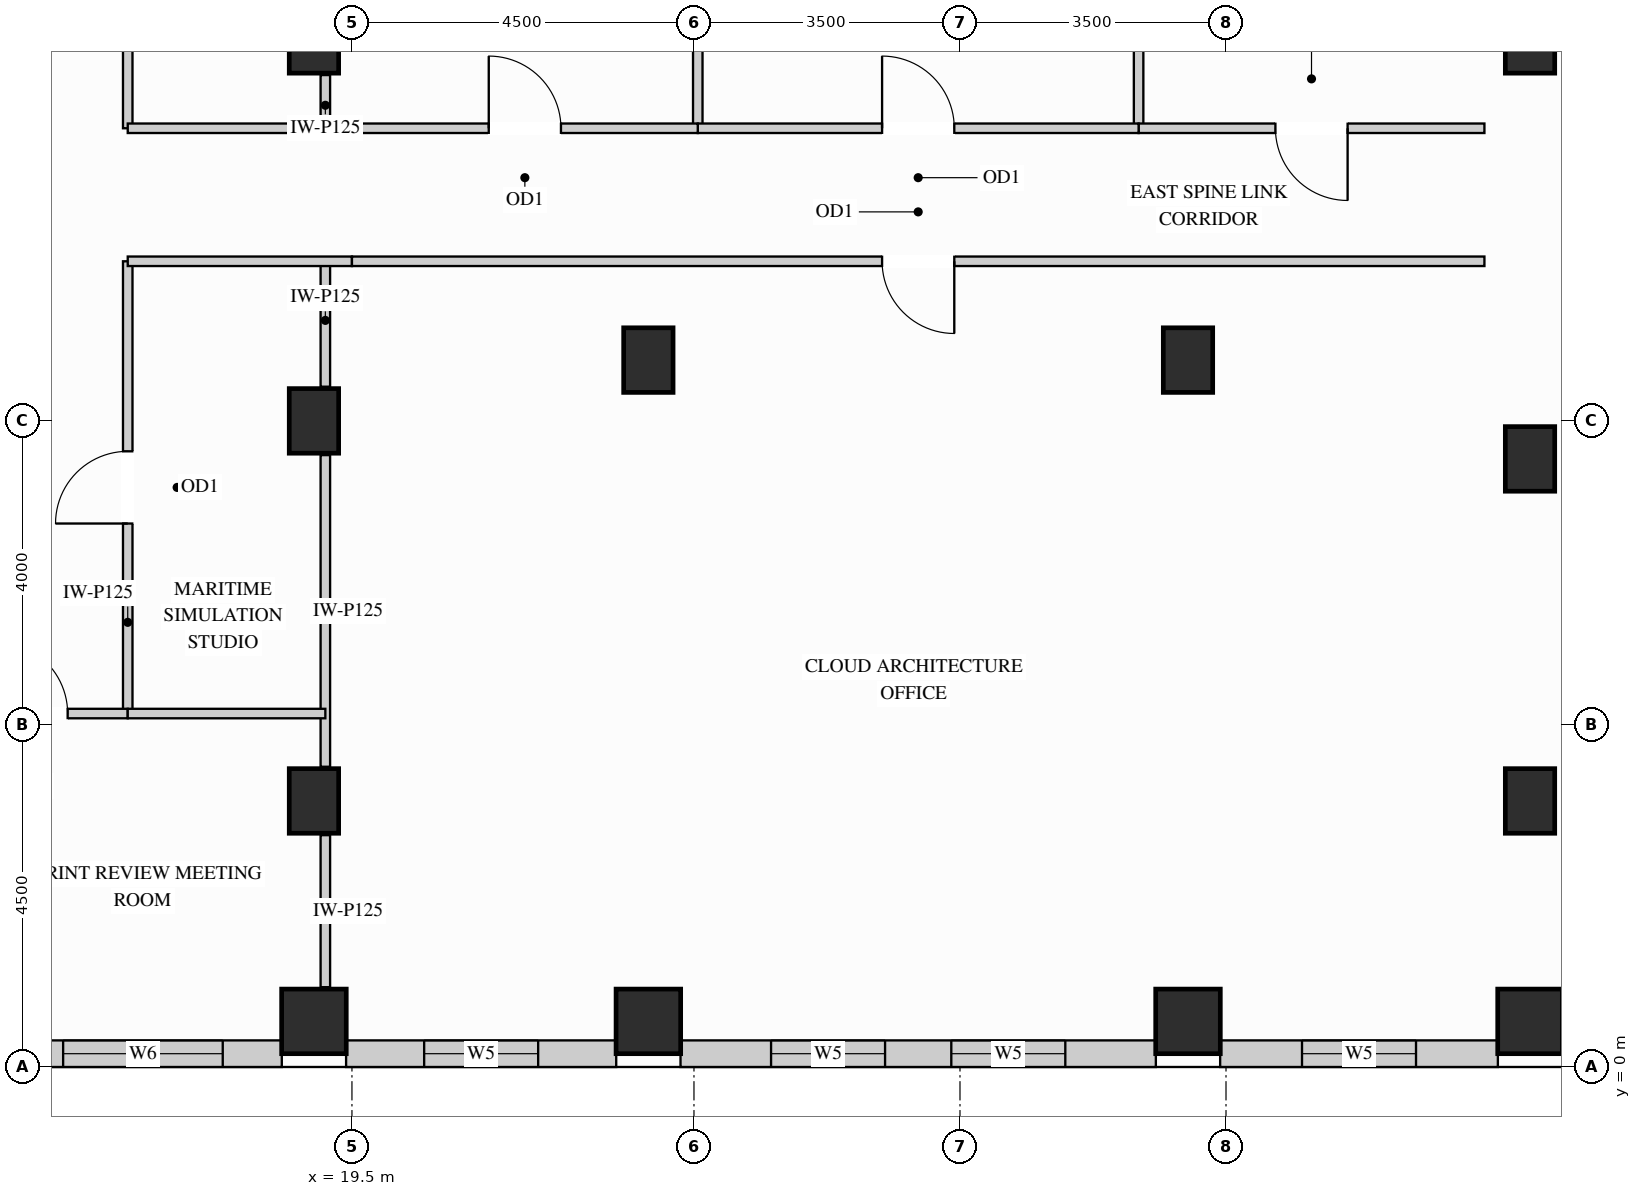
"""IFC4 building model, lengths in metres.
Left out: names, types, materials, properties, quantities, classifications, styles, units other than length and angle.
Written with IfcOpenShell. Run it as: python <this file> out.ifc"""

import sys

from ifc_helpers import new_model, si_unit, direction, frame, frame_2d, origin, origin_2d, place, context, subcontext, project, spatial, rectangle, extrude, source, transform, mapped, element, fill, save


model = new_model("IFC4")
c1 = context("Model", 3, precision=1e-05, world=origin(), true_north=direction((0.0, 1.0)))
c2 = subcontext(c1, "Body", "Model", "MODEL_VIEW")
j1 = project(units=[si_unit("LENGTHUNIT", "METRE"), si_unit("PLANEANGLEUNIT", "RADIAN")], contexts=[c1])
p1 = place(None, origin())
s1 = spatial("IfcSite", under=j1, at=p1, CompositionType="ELEMENT")
p2 = place(p1, origin())
s2 = spatial("IfcBuilding", under=s1, at=p2, CompositionType="ELEMENT")
p3 = place(p2, frame((0.0, 0.0, 255.6)))
s3 = spatial("IfcBuildingStorey", under=s2, at=p3, CompositionType="ELEMENT", Elevation=255.6)
m1 = source(origin(), c2, "Body", "SweptSolid", [
    extrude(rectangle(XDim=0.65, YDim=0.85, at=origin_2d()), origin(), (0.0, 0.0, 1.0), 3.4),
])
for number, where, z_axis, x_axis in (
    (1, (19.0, 13.5, 0.0), (0.0, 0.0, 1.0), (1.0, 0.0, 0.0)),
    (2, (19.0, 3.5, 0.0), (0.0, 0.0, 1.0), (1.0, 0.0, 0.0)),
    (3, (19.0, 8.5, 0.0), (0.0, 0.0, 1.0), (1.0, 0.0, 0.0)),
    (4, (35.0, 13.5, 0.0), (0.0, 0.0, 1.0), (1.0, 0.0, 0.0)),
    (5, (35.0, 3.5, 0.0), (0.0, 0.0, 1.0), (1.0, 0.0, 0.0)),
    (6, (35.0, 8.0, 0.0), (0.0, 0.0, 1.0), (1.0, 0.0, 0.0)),
    (7, (23.4, 9.3, 0.0), (0.0, 0.0, 1.0), (1.0, 0.0, 0.0)),
    (8, (30.5, 9.3, 0.0), (0.0, 0.0, 1.0), (1.0, 0.0, 0.0)),
):
    element("IfcColumn", number, at=place(p3, frame(where, z_axis=z_axis, x_axis=x_axis)), inside=s3, PredefinedType="COLUMN", context=c2, shape_type="MappedRepresentation", body=[
        mapped(m1, transform((0.0, 0.0, 0.0), x_axis=(1.0, 0.0, 0.0), y_axis=(0.0, 1.0, 0.0), z_axis=(0.0, 0.0, 1.0))),
    ])
m2 = source(origin(), c2, "Body", "SweptSolid", [
    extrude(rectangle(XDim=0.85, YDim=0.85, at=origin_2d()), origin(), (0.0, 0.0, 1.0), 3.4),
])
for number, where, z_axis, x_axis in (
    (9, (19.0, 0.6, 0.0), (0.0, 0.0, 1.0), (1.0, 0.0, 0.0)),
    (10, (23.4, 0.6, 0.0), (0.0, 0.0, 1.0), (1.0, 0.0, 0.0)),
    (11, (30.5, 0.6, 0.0), (0.0, 0.0, 1.0), (1.0, 0.0, 0.0)),
    (12, (35.0, 0.6, 0.0), (0.0, 0.0, 1.0), (1.0, 0.0, 0.0)),
):
    element("IfcColumn", number, at=place(p3, frame(where, z_axis=z_axis, x_axis=x_axis)), inside=s3, PredefinedType="COLUMN", context=c2, shape_type="MappedRepresentation", body=[
        mapped(m2, transform((0.0, 0.0, 0.0), x_axis=(1.0, 0.0, 0.0), y_axis=(0.0, 1.0, 0.0), z_axis=(0.0, 0.0, 1.0))),
    ])
p4 = place(p3, frame((14.923, 0.175, 0.0), z_axis=(0.0, 0.0, 1.0), x_axis=(1.0, 0.0, 0.0)))
e13 = element("IfcWall", 13, at=p4, inside=s3, PredefinedType="SOLIDWALL", context=c2, shape_type="SweptSolid", body=[
    extrude(rectangle(XDim=3.654, YDim=0.35, at=frame_2d((1.827, 0.0))), origin(), (0.0, 0.0, 1.0), 3.385),
])
p5 = place(p4, frame((0.777, 0.0, 0.78)))
e14 = element("IfcOpeningElement", 14, at=p5, cuts=e13, PredefinedType="OPENING", context=c2, shape_type="SweptSolid", body=[
    extrude(rectangle(XDim=2.1, YDim=2.25, at=frame_2d((1.05, 1.125))), frame((0.0, 0.185, 0.0), z_axis=(0.0, -1.0, 0.0), x_axis=(1.0, 0.0, 0.0)), (0.0, 0.0, 1.0), 0.37),
])
p6 = place(p3, frame((19.423, 0.175, 0.0), z_axis=(0.0, 0.0, 1.0), x_axis=(1.0, 0.0, 0.0)))
e15 = element("IfcWall", 15, at=p6, inside=s3, PredefinedType="SOLIDWALL", context=c2, shape_type="SweptSolid", body=[
    extrude(rectangle(XDim=3.554, YDim=0.35, at=frame_2d((1.777, 0.0))), origin(), (0.0, 0.0, 1.0), 3.385),
])
p7 = place(p6, frame((1.027, 0.0, 0.78)))
e16 = element("IfcOpeningElement", 16, at=p7, cuts=e15, PredefinedType="OPENING", context=c2, shape_type="SweptSolid", body=[
    extrude(rectangle(XDim=1.5, YDim=2.0, at=frame_2d((0.75, 1.0))), frame((0.0, 0.185, 0.0), z_axis=(0.0, -1.0, 0.0), x_axis=(1.0, 0.0, 0.0)), (0.0, 0.0, 1.0), 0.37),
])
p8 = place(p3, frame((23.823, 0.175, 0.0), z_axis=(0.0, 0.0, 1.0), x_axis=(1.0, 0.0, 0.0)))
e17 = element("IfcWall", 17, at=p8, inside=s3, PredefinedType="SOLIDWALL", context=c2, shape_type="SweptSolid", body=[
    extrude(rectangle(XDim=6.254, YDim=0.35, at=frame_2d((3.127, 0.0))), origin(), (0.0, 0.0, 1.0), 3.385),
])
p9 = place(p8, frame((1.191, 0.0, 0.78)))
e18 = element("IfcOpeningElement", 18, at=p9, cuts=e17, PredefinedType="OPENING", context=c2, shape_type="SweptSolid", body=[
    extrude(rectangle(XDim=1.5, YDim=2.0, at=frame_2d((0.75, 1.0))), frame((0.0, 0.185, 0.0), z_axis=(0.0, -1.0, 0.0), x_axis=(1.0, 0.0, 0.0)), (0.0, 0.0, 1.0), 0.37),
])
p10 = place(p8, frame((3.563, 0.0, 0.78)))
e19 = element("IfcOpeningElement", 19, at=p10, cuts=e17, PredefinedType="OPENING", context=c2, shape_type="SweptSolid", body=[
    extrude(rectangle(XDim=1.5, YDim=2.0, at=frame_2d((0.75, 1.0))), frame((0.0, 0.185, 0.0), z_axis=(0.0, -1.0, 0.0), x_axis=(1.0, 0.0, 0.0)), (0.0, 0.0, 1.0), 0.37),
])
p11 = place(p3, frame((30.923, 0.175, 0.0), z_axis=(0.0, 0.0, 1.0), x_axis=(1.0, 0.0, 0.0)))
e20 = element("IfcWall", 20, at=p11, inside=s3, PredefinedType="SOLIDWALL", context=c2, shape_type="SweptSolid", body=[
    extrude(rectangle(XDim=3.654, YDim=0.35, at=frame_2d((1.827, 0.0))), origin(), (0.0, 0.0, 1.0), 3.385),
])
p12 = place(p11, frame((1.077, 0.0, 0.78)))
e21 = element("IfcOpeningElement", 21, at=p12, cuts=e20, PredefinedType="OPENING", context=c2, shape_type="SweptSolid", body=[
    extrude(rectangle(XDim=1.5, YDim=2.0, at=frame_2d((0.75, 1.0))), frame((0.0, 0.185, 0.0), z_axis=(0.0, -1.0, 0.0), x_axis=(1.0, 0.0, 0.0)), (0.0, 0.0, 1.0), 0.37),
])
m3 = source(origin(), c2, "Body", "SweptSolid", [
    extrude(rectangle(XDim=0.7, YDim=0.125, at=frame_2d((0.35, 0.0))), origin(), (0.0, 0.0, 1.0), 2.773),
])
p13 = place(p3, frame((19.15, 12.35, 0.0), z_axis=(0.0, 0.0, 1.0), x_axis=(0.0, 1.0, 0.0)))
e22 = element("IfcWall", 22, at=p13, inside=s3, PredefinedType="PARTITIONING", context=c2, shape_type="MappedRepresentation", body=[
    mapped(m3, transform((0.0, 0.0, 0.0), x_axis=(1.0, 0.0, 0.0), y_axis=(0.0, 1.0, 0.0), z_axis=(0.0, 0.0, 1.0))),
])
m4 = source(origin(), c2, "Body", "SweptSolid", [
    extrude(rectangle(XDim=2.0, YDim=0.125, at=frame_2d((1.0, 0.0))), origin(), (0.0, 0.0, 1.0), 2.773),
])
p14 = place(p3, frame((19.15, 1.05, 0.0), z_axis=(0.0, 0.0, 1.0), x_axis=(0.0, 1.0, 0.0)))
e23 = element("IfcWall", 23, at=p14, inside=s3, PredefinedType="PARTITIONING", context=c2, shape_type="MappedRepresentation", body=[
    mapped(m4, transform((0.0, 0.0, 0.0), x_axis=(1.0, 0.0, 0.0), y_axis=(0.0, 1.0, 0.0), z_axis=(0.0, 0.0, 1.0))),
])
m5 = source(origin(), c2, "Body", "SweptSolid", [
    extrude(rectangle(XDim=4.1, YDim=0.125, at=frame_2d((2.05, 0.0))), origin(), (0.0, 0.0, 1.0), 2.773),
])
p15 = place(p3, frame((19.15, 3.95, 0.0), z_axis=(0.0, 0.0, 1.0), x_axis=(0.0, 1.0, 0.0)))
e24 = element("IfcWall", 24, at=p15, inside=s3, PredefinedType="PARTITIONING", context=c2, shape_type="MappedRepresentation", body=[
    mapped(m5, transform((0.0, 0.0, 0.0), x_axis=(1.0, 0.0, 0.0), y_axis=(0.0, 1.0, 0.0), z_axis=(0.0, 0.0, 1.0))),
])
m6 = source(origin(), c2, "Body", "SweptSolid", [
    extrude(rectangle(XDim=1.65, YDim=0.125, at=frame_2d((0.825, 0.0))), origin(), (0.0, 0.0, 1.0), 2.773),
])
p16 = place(p3, frame((19.15, 8.95, 0.0), z_axis=(0.0, 0.0, 1.0), x_axis=(0.0, 1.0, 0.0)))
e25 = element("IfcWall", 25, at=p16, inside=s3, PredefinedType="PARTITIONING", context=c2, shape_type="MappedRepresentation", body=[
    mapped(m6, transform((0.0, 0.0, 0.0), x_axis=(1.0, 0.0, 0.0), y_axis=(0.0, 1.0, 0.0), z_axis=(0.0, 0.0, 1.0))),
])
p17 = place(p3, frame((16.55, 12.35, 0.0), z_axis=(0.0, 0.0, 1.0), x_axis=(0.0, 1.0, 0.0)))
e26 = element("IfcWall", 26, at=p17, inside=s3, PredefinedType="PARTITIONING", context=c2, shape_type="SweptSolid", body=[
    extrude(rectangle(XDim=3.65, YDim=0.125, at=frame_2d((1.825, 0.0))), origin(), (0.0, 0.0, 1.0), 3.385),
])
p18 = place(p17, frame((1.35, 0.0, 0.0)))
e27 = element("IfcOpeningElement", 27, at=p18, cuts=e26, PredefinedType="OPENING", context=c2, shape_type="SweptSolid", body=[
    extrude(rectangle(XDim=0.95, YDim=2.15, at=frame_2d((0.475, 1.075))), frame((0.0, 0.073, 0.0), z_axis=(0.0, -1.0, 0.0), x_axis=(1.0, 0.0, 0.0)), (0.0, 0.0, 1.0), 0.145),
])
p19 = place(p3, frame((16.55, 4.65, 0.0), z_axis=(0.0, 0.0, 1.0), x_axis=(0.0, 1.0, 0.0)))
e28 = element("IfcWall", 28, at=p19, inside=s3, PredefinedType="PARTITIONING", context=c2, shape_type="SweptSolid", body=[
    extrude(rectangle(XDim=5.95, YDim=0.125, at=frame_2d((2.975, 0.0))), origin(), (0.0, 0.0, 1.0), 3.385),
])
p20 = place(p19, frame((2.5, 0.0, 0.0)))
e29 = element("IfcOpeningElement", 29, at=p20, cuts=e28, PredefinedType="OPENING", context=c2, shape_type="SweptSolid", body=[
    extrude(rectangle(XDim=0.95, YDim=2.15, at=frame_2d((0.475, 1.075))), frame((0.0, 0.073, 0.0), z_axis=(0.0, -1.0, 0.0), x_axis=(1.0, 0.0, 0.0)), (0.0, 0.0, 1.0), 0.145),
])
m7 = source(origin(), c2, "Body", "SweptSolid", [
    extrude(rectangle(XDim=9.798, YDim=0.125, at=frame_2d((4.899, 0.0))), origin(), (0.0, 0.0, 1.0), 3.385),
])
for number, where, z_axis, x_axis in (
    (30, (24.05, 12.35, 0.0), (0.0, 0.0, 1.0), (0.0, 1.0, 0.0)),
    (31, (29.85, 12.35, 0.0), (0.0, 0.0, 1.0), (0.0, 1.0, 0.0)),
):
    element("IfcWall", number, at=place(p3, frame(where, z_axis=z_axis, x_axis=x_axis)), inside=s3, PredefinedType="PARTITIONING", context=c2, shape_type="MappedRepresentation", body=[
        mapped(m7, transform((0.0, 0.0, 0.0), x_axis=(1.0, 0.0, 0.0), y_axis=(0.0, 1.0, 0.0), z_axis=(0.0, 0.0, 1.0))),
    ])
p21 = place(p3, frame((29.85, 12.35, 0.0), z_axis=(0.0, 0.0, 1.0), x_axis=(1.0, 0.0, 0.0)))
e32 = element("IfcWall", 32, at=p21, inside=s3, PredefinedType="PARTITIONING", context=c2, shape_type="SweptSolid", body=[
    extrude(rectangle(XDim=4.55, YDim=0.125, at=frame_2d((2.275, 0.0))), origin(), (0.0, 0.0, 1.0), 3.385),
])
p22 = place(p21, frame((1.8, 0.0, 0.0)))
e33 = element("IfcOpeningElement", 33, at=p22, cuts=e32, PredefinedType="OPENING", context=c2, shape_type="SweptSolid", body=[
    extrude(rectangle(XDim=0.95, YDim=2.15, at=frame_2d((0.475, 1.075))), frame((0.0, 0.073, 0.0), z_axis=(0.0, -1.0, 0.0), x_axis=(1.0, 0.0, 0.0)), (0.0, 0.0, 1.0), 0.145),
])
p23 = place(p3, frame((24.05, 12.35, 0.0), z_axis=(0.0, 0.0, 1.0), x_axis=(1.0, 0.0, 0.0)))
e34 = element("IfcWall", 34, at=p23, inside=s3, PredefinedType="PARTITIONING", context=c2, shape_type="SweptSolid", body=[
    extrude(rectangle(XDim=5.8, YDim=0.125, at=frame_2d((2.9, 0.0))), origin(), (0.0, 0.0, 1.0), 3.385),
])
p24 = place(p23, frame((2.425, 0.0, 0.0)))
e35 = element("IfcOpeningElement", 35, at=p24, cuts=e34, PredefinedType="OPENING", context=c2, shape_type="SweptSolid", body=[
    extrude(rectangle(XDim=0.95, YDim=2.15, at=frame_2d((0.475, 1.075))), frame((0.0, 0.073, 0.0), z_axis=(0.0, -1.0, 0.0), x_axis=(1.0, 0.0, 0.0)), (0.0, 0.0, 1.0), 0.145),
])
m8 = source(origin(), c2, "Body", "SweptSolid", [
    extrude(rectangle(XDim=2.95, YDim=0.125, at=frame_2d((1.475, 0.0))), origin(), (0.0, 0.0, 1.0), 3.385),
])
p25 = place(p3, frame((16.55, 12.35, 0.0), z_axis=(0.0, 0.0, 1.0), x_axis=(1.0, 0.0, 0.0)))
e36 = element("IfcWall", 36, at=p25, inside=s3, PredefinedType="PARTITIONING", context=c2, shape_type="MappedRepresentation", body=[
    mapped(m8, transform((0.0, 0.0, 0.0), x_axis=(1.0, 0.0, 0.0), y_axis=(0.0, 1.0, 0.0), z_axis=(0.0, 0.0, 1.0))),
])
p26 = place(p3, frame((19.5, 12.35, 0.0), z_axis=(0.0, 0.0, 1.0), x_axis=(1.0, 0.0, 0.0)))
e37 = element("IfcWall", 37, at=p26, inside=s3, PredefinedType="PARTITIONING", context=c2, shape_type="SweptSolid", body=[
    extrude(rectangle(XDim=4.55, YDim=0.125, at=frame_2d((2.275, 0.0))), origin(), (0.0, 0.0, 1.0), 3.385),
])
p27 = place(p26, frame((1.8, 0.0, 0.0)))
e38 = element("IfcOpeningElement", 38, at=p27, cuts=e37, PredefinedType="OPENING", context=c2, shape_type="SweptSolid", body=[
    extrude(rectangle(XDim=0.95, YDim=2.15, at=frame_2d((0.475, 1.075))), frame((0.0, 0.073, 0.0), z_axis=(0.0, -1.0, 0.0), x_axis=(1.0, 0.0, 0.0)), (0.0, 0.0, 1.0), 0.145),
])
p28 = place(p3, frame((16.55, 10.6, 0.0), z_axis=(0.0, 0.0, 1.0), x_axis=(1.0, 0.0, 0.0)))
e39 = element("IfcWall", 39, at=p28, inside=s3, PredefinedType="PARTITIONING", context=c2, shape_type="MappedRepresentation", body=[
    mapped(m8, transform((0.0, 0.0, 0.0), x_axis=(1.0, 0.0, 0.0), y_axis=(0.0, 1.0, 0.0), z_axis=(0.0, 0.0, 1.0))),
])
p29 = place(p3, frame((19.5, 10.6, 0.0), z_axis=(0.0, 0.0, 1.0), x_axis=(1.0, 0.0, 0.0)))
e40 = element("IfcWall", 40, at=p29, inside=s3, PredefinedType="PARTITIONING", context=c2, shape_type="SweptSolid", body=[
    extrude(rectangle(XDim=14.9, YDim=0.125, at=frame_2d((7.45, 0.0))), origin(), (0.0, 0.0, 1.0), 3.385),
])
p30 = place(p29, frame((6.975, 0.0, 0.0)))
e41 = element("IfcOpeningElement", 41, at=p30, cuts=e40, PredefinedType="OPENING", context=c2, shape_type="SweptSolid", body=[
    extrude(rectangle(XDim=0.95, YDim=2.15, at=frame_2d((0.475, 1.075))), frame((0.0, 0.073, 0.0), z_axis=(0.0, -1.0, 0.0), x_axis=(1.0, 0.0, 0.0)), (0.0, 0.0, 1.0), 0.145),
])
p31 = place(p3, frame((14.019, 4.65, 0.0), z_axis=(0.0, 0.0, 1.0), x_axis=(1.0, 0.0, 0.0)))
e42 = element("IfcWall", 42, at=p31, inside=s3, PredefinedType="PARTITIONING", context=c2, shape_type="SweptSolid", body=[
    extrude(rectangle(XDim=2.531, YDim=0.125, at=frame_2d((1.266, 0.0))), origin(), (0.0, 0.0, 1.0), 2.848),
])
p32 = place(p31, frame((0.791, 0.0, 0.0)))
e43 = element("IfcOpeningElement", 43, at=p32, cuts=e42, PredefinedType="OPENING", context=c2, shape_type="SweptSolid", body=[
    extrude(rectangle(XDim=0.95, YDim=2.15, at=frame_2d((0.475, 1.075))), frame((0.0, 0.073, 0.0), z_axis=(0.0, -1.0, 0.0), x_axis=(1.0, 0.0, 0.0)), (0.0, 0.0, 1.0), 0.145),
])
m9 = source(origin(), c2, "Body", "SweptSolid", [
    extrude(rectangle(XDim=2.6, YDim=0.125, at=frame_2d((1.3, 0.0))), origin(), (0.0, 0.0, 1.0), 2.848),
])
p33 = place(p3, frame((16.55, 4.65, 0.0), z_axis=(0.0, 0.0, 1.0), x_axis=(1.0, 0.0, 0.0)))
e44 = element("IfcWall", 44, at=p33, inside=s3, PredefinedType="PARTITIONING", context=c2, shape_type="MappedRepresentation", body=[
    mapped(m9, transform((0.0, 0.0, 0.0), x_axis=(1.0, 0.0, 0.0), y_axis=(0.0, 1.0, 0.0), z_axis=(0.0, 0.0, 1.0))),
])
m10 = source(origin(), c2, "Body", "SweptSolid", [
    extrude(rectangle(XDim=0.95, YDim=2.15, at=frame_2d((0.475, 1.075))), frame((0.0, 0.025, 0.0), z_axis=(0.0, -1.0, 0.0), x_axis=(1.0, 0.0, 0.0)), (0.0, 0.0, 1.0), 0.05),
])
p34 = place(p20, origin())
e45 = element("IfcDoor", 45, at=p34, inside=s3, OperationType="SINGLE_SWING_LEFT", PredefinedType="DOOR", context=c2, shape_type="MappedRepresentation", body=[
    mapped(m10, transform((0.0, 0.0, 0.0), x_axis=(1.0, 0.0, 0.0), y_axis=(0.0, 1.0, 0.0), z_axis=(0.0, 0.0, 1.0))),
])
fill(e29, e45)
p35 = place(p32, origin())
e46 = element("IfcDoor", 46, at=p35, inside=s3, OperationType="SINGLE_SWING_LEFT", PredefinedType="DOOR", context=c2, shape_type="MappedRepresentation", body=[
    mapped(m10, transform((0.0, 0.0, 0.0), x_axis=(1.0, 0.0, 0.0), y_axis=(0.0, 1.0, 0.0), z_axis=(0.0, 0.0, 1.0))),
])
fill(e43, e46)
p36 = place(p24, origin())
e47 = element("IfcDoor", 47, at=p36, inside=s3, OperationType="SINGLE_SWING_LEFT", PredefinedType="DOOR", context=c2, shape_type="MappedRepresentation", body=[
    mapped(m10, transform((0.0, 0.0, 0.0), x_axis=(1.0, 0.0, 0.0), y_axis=(0.0, 1.0, 0.0), z_axis=(0.0, 0.0, 1.0))),
])
fill(e35, e47)
p37 = place(p27, origin())
e48 = element("IfcDoor", 48, at=p37, inside=s3, OperationType="SINGLE_SWING_LEFT", PredefinedType="DOOR", context=c2, shape_type="MappedRepresentation", body=[
    mapped(m10, transform((0.0, 0.0, 0.0), x_axis=(1.0, 0.0, 0.0), y_axis=(0.0, 1.0, 0.0), z_axis=(0.0, 0.0, 1.0))),
])
fill(e38, e48)
p38 = place(p22, origin())
e49 = element("IfcDoor", 49, at=p38, inside=s3, OperationType="SINGLE_SWING_RIGHT", PredefinedType="DOOR", context=c2, shape_type="MappedRepresentation", body=[
    mapped(m10, transform((0.0, 0.0, 0.0), x_axis=(1.0, 0.0, 0.0), y_axis=(0.0, 1.0, 0.0), z_axis=(0.0, 0.0, 1.0))),
])
fill(e33, e49)
p39 = place(p30, origin())
e50 = element("IfcDoor", 50, at=p39, inside=s3, OperationType="SINGLE_SWING_RIGHT", PredefinedType="DOOR", context=c2, shape_type="MappedRepresentation", body=[
    mapped(m10, transform((0.0, 0.0, 0.0), x_axis=(1.0, 0.0, 0.0), y_axis=(0.0, 1.0, 0.0), z_axis=(0.0, 0.0, 1.0))),
])
fill(e41, e50)
m11 = source(origin(), c2, "Body", "SweptSolid", [
    extrude(rectangle(XDim=1.5, YDim=2.0, at=frame_2d((0.75, 1.0))), frame((0.0, 0.03, 0.0), z_axis=(0.0, -1.0, 0.0), x_axis=(1.0, 0.0, 0.0)), (0.0, 0.0, 1.0), 0.06),
])
p40 = place(p7, origin())
e51 = element("IfcWindow", 51, at=p40, inside=s3, PartitioningType="SINGLE_PANEL", PredefinedType="WINDOW", context=c2, shape_type="MappedRepresentation", body=[
    mapped(m11, transform((0.0, 0.0, 0.0), x_axis=(1.0, 0.0, 0.0), y_axis=(0.0, 1.0, 0.0), z_axis=(0.0, 0.0, 1.0))),
])
fill(e16, e51)
p41 = place(p9, origin())
e52 = element("IfcWindow", 52, at=p41, inside=s3, PartitioningType="SINGLE_PANEL", PredefinedType="WINDOW", context=c2, shape_type="MappedRepresentation", body=[
    mapped(m11, transform((0.0, 0.0, 0.0), x_axis=(1.0, 0.0, 0.0), y_axis=(0.0, 1.0, 0.0), z_axis=(0.0, 0.0, 1.0))),
])
fill(e18, e52)
p42 = place(p10, origin())
e53 = element("IfcWindow", 53, at=p42, inside=s3, PartitioningType="SINGLE_PANEL", PredefinedType="WINDOW", context=c2, shape_type="MappedRepresentation", body=[
    mapped(m11, transform((0.0, 0.0, 0.0), x_axis=(1.0, 0.0, 0.0), y_axis=(0.0, 1.0, 0.0), z_axis=(0.0, 0.0, 1.0))),
])
fill(e19, e53)
p43 = place(p12, origin())
e54 = element("IfcWindow", 54, at=p43, inside=s3, PartitioningType="SINGLE_PANEL", PredefinedType="WINDOW", context=c2, shape_type="MappedRepresentation", body=[
    mapped(m11, transform((0.0, 0.0, 0.0), x_axis=(1.0, 0.0, 0.0), y_axis=(0.0, 1.0, 0.0), z_axis=(0.0, 0.0, 1.0))),
])
fill(e21, e54)
m12 = source(origin(), c2, "Body", "SweptSolid", [
    extrude(rectangle(XDim=2.1, YDim=2.25, at=frame_2d((1.05, 1.125))), frame((0.0, 0.03, 0.0), z_axis=(0.0, -1.0, 0.0), x_axis=(1.0, 0.0, 0.0)), (0.0, 0.0, 1.0), 0.06),
])
p44 = place(p5, origin())
e55 = element("IfcWindow", 55, at=p44, inside=s3, PartitioningType="SINGLE_PANEL", PredefinedType="WINDOW", context=c2, shape_type="MappedRepresentation", body=[
    mapped(m12, transform((0.0, 0.0, 0.0), x_axis=(1.0, 0.0, 0.0), y_axis=(0.0, 1.0, 0.0), z_axis=(0.0, 0.0, 1.0))),
])
fill(e14, e55)
save(model, sys.argv[1])
